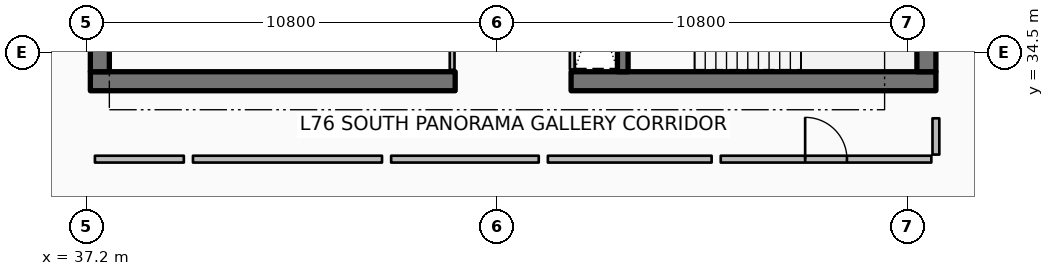
"""IFC4 building model, lengths in metres.
Left out: names, types, materials, properties, quantities, classifications, styles, units other than length and angle.
Written with IfcOpenShell. Run it as: python <this file> out.ifc"""

import sys

from ifc_helpers import new_model, si_unit, direction, frame, frame_2d, origin, place, context, subcontext, project, spatial, rectangle, extrude, element, fill, save


model = new_model("IFC4")
c1 = context("Model", 3, precision=1e-05, world=origin(), true_north=direction((0.0, 1.0)))
c2 = subcontext(c1, "Body", "Model", "MODEL_VIEW")
j1 = project(units=[si_unit("LENGTHUNIT", "METRE"), si_unit("PLANEANGLEUNIT", "RADIAN")], contexts=[c1])
p1 = place(None, origin())
s1 = spatial("IfcSite", under=j1, at=p1, CompositionType="ELEMENT")
p2 = place(p1, origin())
s2 = spatial("IfcBuilding", under=s1, at=p2, CompositionType="ELEMENT")
p3 = place(p2, frame((0.0, 0.0, 302.15)))
s3 = spatial("IfcBuildingStorey", under=s2, at=p3, CompositionType="ELEMENT", Elevation=302.15)
p4 = place(p3, frame((37.3, 33.75, 0.0), z_axis=(0.0, 0.0, 1.0), x_axis=(1.0, 0.0, 0.0)))
e1 = element("IfcWall", 1, at=p4, inside=s3, PredefinedType="SHEAR", context=c2, shape_type="SweptSolid", body=[
    extrude(rectangle(XDim=9.6, YDim=0.5, at=frame_2d((4.8, 0.0))), origin(), (0.0, 0.0, 1.0), 3.85),
])
p5 = place(p3, frame((49.95, 33.75, 0.0), z_axis=(0.0, 0.0, 1.0), x_axis=(1.0, 0.0, 0.0)))
e2 = element("IfcWall", 2, at=p5, inside=s3, PredefinedType="SHEAR", context=c2, shape_type="SweptSolid", body=[
    extrude(rectangle(XDim=9.6, YDim=0.5, at=frame_2d((4.8, 0.0))), origin(), (0.0, 0.0, 1.0), 3.85),
])
for number, where, z_axis, x_axis in (
    (3, (37.55, 34.0, 0.0), (0.0, 0.0, 1.0), (0.0, 1.0, 0.0)),
    (4, (59.3, 34.0, 0.0), (0.0, 0.0, 1.0), (0.0, 1.0, 0.0)),
):
    element("IfcWall", number, at=place(p3, frame(where, z_axis=z_axis, x_axis=x_axis)), inside=s3, PredefinedType="SHEAR", context=c2, shape_type="SweptSolid", body=[
        extrude(rectangle(XDim=16.0, YDim=0.5, at=frame_2d((8.0, 0.0))), origin(), (0.0, 0.0, 1.0), 3.85),
    ])
p6 = place(p3, frame((51.31, 34.0, 0.0), z_axis=(0.0, 0.0, 1.0), x_axis=(0.0, 1.0, 0.0)))
e5 = element("IfcWall", 5, at=p6, inside=s3, PredefinedType="SHEAR", context=c2, shape_type="SweptSolid", body=[
    extrude(rectangle(XDim=3.5, YDim=0.28, at=frame_2d((1.75, 0.0))), origin(), (0.0, 0.0, 1.0), 3.85),
])
p7 = place(p3, frame((46.82, 34.05, 0.0), z_axis=(0.0, 0.0, 1.0), x_axis=(0.0, 1.0, 0.0)))
e6 = element("IfcWall", 6, at=p7, inside=s3, PredefinedType="PARTITIONING", context=c2, shape_type="SweptSolid", body=[
    extrude(rectangle(XDim=2.03, YDim=0.125, at=frame_2d((1.015, 0.0))), origin(), (0.0, 0.0, 1.0), 2.89),
])
p8 = place(p3, frame((49.98, 34.06, 0.0), z_axis=(0.0, 0.0, 1.0), x_axis=(0.0, 1.0, 0.0)))
e7 = element("IfcWall", 7, at=p8, inside=s3, PredefinedType="PARTITIONING", context=c2, shape_type="SweptSolid", body=[
    extrude(rectangle(XDim=3.4, YDim=0.125, at=frame_2d((1.7, 0.0))), origin(), (0.0, 0.0, 1.0), 2.89),
])
p9 = place(p3, frame((53.888, 31.7, 0.0), z_axis=(0.0, 0.0, 1.0), x_axis=(1.0, 0.0, 0.0)))
e8 = element("IfcWall", 8, at=p9, inside=s3, PredefinedType="PARTITIONING", context=c2, shape_type="SweptSolid", body=[
    extrude(rectangle(XDim=5.542, YDim=0.18, at=frame_2d((2.771, 0.0))), origin(), (0.0, 0.0, 1.0), 2.407),
])
p10 = place(p9, frame((2.221, 0.0, 0.0)))
e9 = element("IfcOpeningElement", 9, at=p10, cuts=e8, PredefinedType="OPENING", context=c2, shape_type="SweptSolid", body=[
    extrude(rectangle(XDim=1.1, YDim=2.1, at=frame_2d((0.55, 1.05))), frame((0.0, 0.1, 0.0), z_axis=(0.0, -1.0, 0.0), x_axis=(1.0, 0.0, 0.0)), (0.0, 0.0, 1.0), 0.2),
])
p11 = place(p3, frame((59.55, 31.82, 0.0), z_axis=(0.0, 0.0, 1.0), x_axis=(0.0, 1.0, 0.0)))
e10 = element("IfcWall", 10, at=p11, inside=s3, PredefinedType="PARTITIONING", context=c2, shape_type="SweptSolid", body=[
    extrude(rectangle(XDim=0.955, YDim=0.18, at=frame_2d((0.477, 0.0))), origin(), (0.0, 0.0, 1.0), 2.407),
])
p12 = place(p3, frame((37.42, 31.7, 0.0), z_axis=(0.0, 0.0, 1.0), x_axis=(1.0, 0.0, 0.0)))
e11 = element("IfcWall", 11, at=p12, inside=s3, PredefinedType="PARTITIONING", context=c2, shape_type="SweptSolid", body=[
    extrude(rectangle(XDim=2.34, YDim=0.18, at=frame_2d((1.17, 0.0))), origin(), (0.0, 0.0, 1.0), 2.407),
])
p13 = place(p3, frame((40.0, 31.7, 0.0), z_axis=(0.0, 0.0, 1.0), x_axis=(1.0, 0.0, 0.0)))
e12 = element("IfcWall", 12, at=p13, inside=s3, PredefinedType="PARTITIONING", context=c2, shape_type="SweptSolid", body=[
    extrude(rectangle(XDim=4.975, YDim=0.18, at=frame_2d((2.488, 0.0))), origin(), (0.0, 0.0, 1.0), 2.407),
])
p14 = place(p3, frame((45.215, 31.7, 0.0), z_axis=(0.0, 0.0, 1.0), x_axis=(1.0, 0.0, 0.0)))
e13 = element("IfcWall", 13, at=p14, inside=s3, PredefinedType="PARTITIONING", context=c2, shape_type="SweptSolid", body=[
    extrude(rectangle(XDim=3.884, YDim=0.18, at=frame_2d((1.942, 0.0))), origin(), (0.0, 0.0, 1.0), 2.407),
])
p15 = place(p3, frame((49.339, 31.7, 0.0), z_axis=(0.0, 0.0, 1.0), x_axis=(1.0, 0.0, 0.0)))
e14 = element("IfcWall", 14, at=p15, inside=s3, PredefinedType="PARTITIONING", context=c2, shape_type="SweptSolid", body=[
    extrude(rectangle(XDim=4.309, YDim=0.18, at=frame_2d((2.155, 0.0))), origin(), (0.0, 0.0, 1.0), 2.407),
])
p16 = place(p10, origin())
e15 = element("IfcDoor", 15, at=p16, inside=s3, OperationType="SINGLE_SWING_LEFT", PredefinedType="DOOR", context=c2, shape_type="SweptSolid", body=[
    extrude(rectangle(XDim=1.1, YDim=2.1, at=frame_2d((0.55, 1.05))), frame((0.0, 0.025, 0.0), z_axis=(0.0, -1.0, 0.0), x_axis=(1.0, 0.0, 0.0)), (0.0, 0.0, 1.0), 0.05),
])
fill(e9, e15)
save(model, sys.argv[1])
